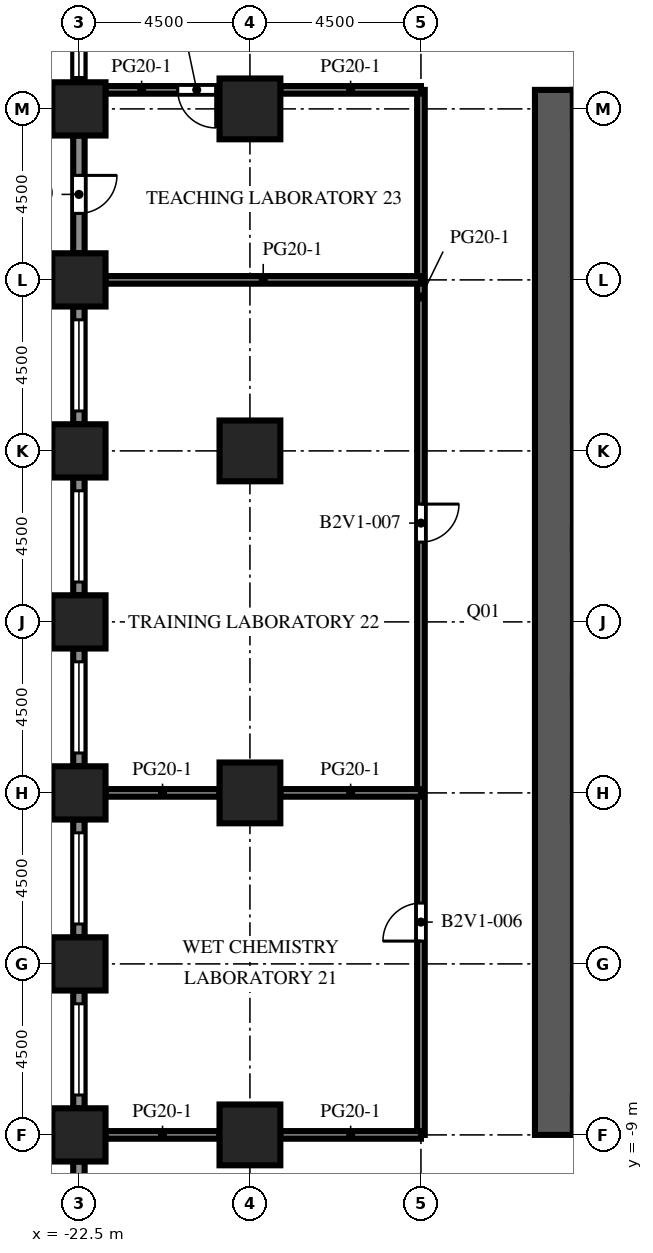
"""IFC4 building model, lengths in metres.
Left out: names, types, materials, properties, quantities, classifications, styles, units other than length and angle.
Written with IfcOpenShell. Run it as: python <this file> out.ifc"""

import sys

from ifc_helpers import new_model, si_unit, direction, frame, frame_2d, origin, origin_2d, place, context, subcontext, project, spatial, rectangle, extrude, element, fill, save


model = new_model("IFC4")
c1 = context("Model", 3, precision=1e-05, world=origin(), true_north=direction((0.0, 1.0)))
c2 = subcontext(c1, "Body", "Model", "MODEL_VIEW")
j1 = project(units=[si_unit("LENGTHUNIT", "METRE"), si_unit("PLANEANGLEUNIT", "RADIAN")], contexts=[c1])
p1 = place(None, origin())
s1 = spatial("IfcSite", under=j1, at=p1, CompositionType="ELEMENT")
p2 = place(p1, origin())
s2 = spatial("IfcBuilding", under=s1, at=p2, CompositionType="ELEMENT")
p3 = place(p2, frame((0.0, 0.0, 46.0)))
s3 = spatial("IfcBuildingStorey", under=s2, at=p3, CompositionType="ELEMENT", Elevation=46.0)
for number, where, z_axis, x_axis in (
    (1, (-22.5, -9.0, 0.0), (0.0, 0.0, 1.0), (1.0, 0.0, 0.0)),
    (2, (-22.5, -4.5, 0.0), (0.0, 0.0, 1.0), (1.0, 0.0, 0.0)),
    (3, (-22.5, 0.0, 0.0), (0.0, 0.0, 1.0), (1.0, 0.0, 0.0)),
    (4, (-22.5, 4.5, 0.0), (0.0, 0.0, 1.0), (1.0, 0.0, 0.0)),
    (5, (-22.5, 9.0, 0.0), (0.0, 0.0, 1.0), (1.0, 0.0, 0.0)),
    (6, (-22.5, 13.5, 0.0), (0.0, 0.0, 1.0), (1.0, 0.0, 0.0)),
    (7, (-22.5, 18.0, 0.0), (0.0, 0.0, 1.0), (1.0, 0.0, 0.0)),
):
    element("IfcColumn", number, at=place(p3, frame(where, z_axis=z_axis, x_axis=x_axis)), inside=s3, PredefinedType="COLUMN", context=c2, shape_type="SweptSolid", body=[
        extrude(rectangle(XDim=1.4, YDim=1.4, at=origin_2d()), origin(), (0.0, 0.0, 1.0), 4.1),
    ])
for number, where, z_axis, x_axis in (
    (8, (-18.0, -9.0, 0.0), (0.0, 0.0, 1.0), (1.0, 0.0, 0.0)),
    (9, (-18.0, 0.0, 0.0), (0.0, 0.0, 1.0), (1.0, 0.0, 0.0)),
    (10, (-18.0, 9.0, 0.0), (0.0, 0.0, 1.0), (1.0, 0.0, 0.0)),
    (11, (-18.0, 18.0, 0.0), (0.0, 0.0, 1.0), (1.0, 0.0, 0.0)),
):
    element("IfcColumn", number, at=place(p3, frame(where, z_axis=z_axis, x_axis=x_axis)), inside=s3, PredefinedType="COLUMN", context=c2, shape_type="SweptSolid", body=[
        extrude(rectangle(XDim=1.6, YDim=1.6, at=origin_2d()), origin(), (0.0, 0.0, 1.0), 4.1),
    ])
p4 = place(p3, frame((-10.0, -9.0, 0.0), z_axis=(0.0, 0.0, 1.0), x_axis=(0.0, 1.0, 0.0)))
e12 = element("IfcWall", 12, at=p4, inside=s3, PredefinedType="SHEAR", context=c2, shape_type="SweptSolid", body=[
    extrude(rectangle(XDim=27.5, YDim=1.0, at=frame_2d((13.75, 0.0))), origin(), (0.0, 0.0, 1.0), 4.1),
])
p5 = place(p4, frame((12.55, 0.0, 0.0)))
e13 = element("IfcOpeningElement", 13, at=p5, cuts=e12, PredefinedType="OPENING", context=c2, shape_type="SweptSolid", body=[
    extrude(rectangle(XDim=2.4, YDim=2.4, at=frame_2d((1.2, 1.2))), frame((0.0, 0.51, 0.0), z_axis=(0.0, -1.0, 0.0), x_axis=(1.0, 0.0, 0.0)), (0.0, 0.0, 1.0), 1.02),
])
p6 = place(p4, frame((6.825, 0.0, 0.0)))
e14 = element("IfcOpeningElement", 14, at=p6, cuts=e12, PredefinedType="OPENING", context=c2, shape_type="SweptSolid", body=[
    extrude(rectangle(XDim=1.2, YDim=2.1, at=frame_2d((0.6, 1.05))), frame((0.0, 0.51, 0.0), z_axis=(0.0, -1.0, 0.0), x_axis=(1.0, 0.0, 0.0)), (0.0, 0.0, 1.0), 1.02),
])
p7 = place(p4, frame((19.475, 0.0, 0.0)))
e15 = element("IfcOpeningElement", 15, at=p7, cuts=e12, PredefinedType="OPENING", context=c2, shape_type="SweptSolid", body=[
    extrude(rectangle(XDim=1.2, YDim=2.1, at=frame_2d((0.6, 1.05))), frame((0.0, 0.51, 0.0), z_axis=(0.0, -1.0, 0.0), x_axis=(1.0, 0.0, 0.0)), (0.0, 0.0, 1.0), 1.02),
])
p8 = place(p3, frame((-22.5, 18.7, 0.0), z_axis=(0.0, 0.0, 1.0), x_axis=(0.0, 1.0, 0.0)))
e16 = element("IfcWall", 16, at=p8, inside=s3, PredefinedType="SOLIDWALL", context=c2, shape_type="SweptSolid", body=[
    extrude(rectangle(XDim=3.1, YDim=0.3, at=frame_2d((1.55, 0.0))), origin(), (0.0, 0.0, 1.0), 2.75),
])
p9 = place(p8, frame((0.125, 0.0, 0.8)))
e17 = element("IfcOpeningElement", 17, at=p9, cuts=e16, PredefinedType="OPENING", context=c2, shape_type="SweptSolid", body=[
    extrude(rectangle(XDim=2.4, YDim=1.7, at=frame_2d((1.2, 0.85))), frame((0.0, 0.16, 0.0), z_axis=(0.0, -1.0, 0.0), x_axis=(1.0, 0.0, 0.0)), (0.0, 0.0, 1.0), 0.32),
])
p10 = place(p3, frame((-22.5, 14.2, 0.0), z_axis=(0.0, 0.0, 1.0), x_axis=(0.0, 1.0, 0.0)))
e18 = element("IfcWall", 18, at=p10, inside=s3, PredefinedType="SOLIDWALL", context=c2, shape_type="SweptSolid", body=[
    extrude(rectangle(XDim=3.1, YDim=0.3, at=frame_2d((1.55, 0.0))), origin(), (0.0, 0.0, 1.0), 2.75),
])
p11 = place(p10, frame((1.05, 0.0, 0.0)))
e19 = element("IfcOpeningElement", 19, at=p11, cuts=e18, PredefinedType="OPENING", context=c2, shape_type="SweptSolid", body=[
    extrude(rectangle(XDim=1.0, YDim=2.2, at=frame_2d((0.5, 1.1))), frame((0.0, 0.16, 0.0), z_axis=(0.0, -1.0, 0.0), x_axis=(1.0, 0.0, 0.0)), (0.0, 0.0, 1.0), 0.32),
])
p12 = place(p3, frame((-22.5, 9.7, 0.0), z_axis=(0.0, 0.0, 1.0), x_axis=(0.0, 1.0, 0.0)))
e20 = element("IfcWall", 20, at=p12, inside=s3, PredefinedType="SOLIDWALL", context=c2, shape_type="SweptSolid", body=[
    extrude(rectangle(XDim=3.1, YDim=0.3, at=frame_2d((1.55, 0.0))), origin(), (0.0, 0.0, 1.0), 2.75),
])
p13 = place(p12, frame((0.35, 0.0, 0.8)))
e21 = element("IfcOpeningElement", 21, at=p13, cuts=e20, PredefinedType="OPENING", context=c2, shape_type="SweptSolid", body=[
    extrude(rectangle(XDim=2.4, YDim=1.7, at=frame_2d((1.2, 0.85))), frame((0.0, 0.16, 0.0), z_axis=(0.0, -1.0, 0.0), x_axis=(1.0, 0.0, 0.0)), (0.0, 0.0, 1.0), 0.32),
])
p14 = place(p3, frame((-22.5, 5.2, 0.0), z_axis=(0.0, 0.0, 1.0), x_axis=(0.0, 1.0, 0.0)))
e22 = element("IfcWall", 22, at=p14, inside=s3, PredefinedType="SOLIDWALL", context=c2, shape_type="SweptSolid", body=[
    extrude(rectangle(XDim=3.1, YDim=0.3, at=frame_2d((1.55, 0.0))), origin(), (0.0, 0.0, 1.0), 2.75),
])
p15 = place(p14, frame((0.35, 0.0, 0.8)))
e23 = element("IfcOpeningElement", 23, at=p15, cuts=e22, PredefinedType="OPENING", context=c2, shape_type="SweptSolid", body=[
    extrude(rectangle(XDim=2.4, YDim=1.7, at=frame_2d((1.2, 0.85))), frame((0.0, 0.16, 0.0), z_axis=(0.0, -1.0, 0.0), x_axis=(1.0, 0.0, 0.0)), (0.0, 0.0, 1.0), 0.32),
])
p16 = place(p3, frame((-22.5, 0.7, 0.0), z_axis=(0.0, 0.0, 1.0), x_axis=(0.0, 1.0, 0.0)))
e24 = element("IfcWall", 24, at=p16, inside=s3, PredefinedType="SOLIDWALL", context=c2, shape_type="SweptSolid", body=[
    extrude(rectangle(XDim=3.1, YDim=0.3, at=frame_2d((1.55, 0.0))), origin(), (0.0, 0.0, 1.0), 2.75),
])
p17 = place(p16, frame((0.35, 0.0, 0.8)))
e25 = element("IfcOpeningElement", 25, at=p17, cuts=e24, PredefinedType="OPENING", context=c2, shape_type="SweptSolid", body=[
    extrude(rectangle(XDim=2.4, YDim=1.7, at=frame_2d((1.2, 0.85))), frame((0.0, 0.16, 0.0), z_axis=(0.0, -1.0, 0.0), x_axis=(1.0, 0.0, 0.0)), (0.0, 0.0, 1.0), 0.32),
])
p18 = place(p3, frame((-22.5, -3.8, 0.0), z_axis=(0.0, 0.0, 1.0), x_axis=(0.0, 1.0, 0.0)))
e26 = element("IfcWall", 26, at=p18, inside=s3, PredefinedType="SOLIDWALL", context=c2, shape_type="SweptSolid", body=[
    extrude(rectangle(XDim=3.1, YDim=0.3, at=frame_2d((1.55, 0.0))), origin(), (0.0, 0.0, 1.0), 2.75),
])
p19 = place(p18, frame((0.35, 0.0, 0.8)))
e27 = element("IfcOpeningElement", 27, at=p19, cuts=e26, PredefinedType="OPENING", context=c2, shape_type="SweptSolid", body=[
    extrude(rectangle(XDim=2.4, YDim=1.7, at=frame_2d((1.2, 0.85))), frame((0.0, 0.16, 0.0), z_axis=(0.0, -1.0, 0.0), x_axis=(1.0, 0.0, 0.0)), (0.0, 0.0, 1.0), 0.32),
])
p20 = place(p3, frame((-22.5, -8.3, 0.0), z_axis=(0.0, 0.0, 1.0), x_axis=(0.0, 1.0, 0.0)))
e28 = element("IfcWall", 28, at=p20, inside=s3, PredefinedType="SOLIDWALL", context=c2, shape_type="SweptSolid", body=[
    extrude(rectangle(XDim=3.1, YDim=0.3, at=frame_2d((1.55, 0.0))), origin(), (0.0, 0.0, 1.0), 2.75),
])
p21 = place(p20, frame((0.35, 0.0, 0.8)))
e29 = element("IfcOpeningElement", 29, at=p21, cuts=e28, PredefinedType="OPENING", context=c2, shape_type="SweptSolid", body=[
    extrude(rectangle(XDim=2.4, YDim=1.7, at=frame_2d((1.2, 0.85))), frame((0.0, 0.16, 0.0), z_axis=(0.0, -1.0, 0.0), x_axis=(1.0, 0.0, 0.0)), (0.0, 0.0, 1.0), 0.32),
])
p22 = place(p3, frame((-22.5, -12.8, 0.0), z_axis=(0.0, 0.0, 1.0), x_axis=(0.0, 1.0, 0.0)))
e30 = element("IfcWall", 30, at=p22, inside=s3, PredefinedType="SOLIDWALL", context=c2, shape_type="SweptSolid", body=[
    extrude(rectangle(XDim=3.1, YDim=0.3, at=frame_2d((1.55, 0.0))), origin(), (0.0, 0.0, 1.0), 2.75),
])
p23 = place(p22, frame((1.425, 0.0, 0.8)))
e31 = element("IfcOpeningElement", 31, at=p23, cuts=e30, PredefinedType="OPENING", context=c2, shape_type="SweptSolid", body=[
    extrude(rectangle(XDim=1.2, YDim=1.7, at=frame_2d((0.6, 0.85))), frame((0.0, 0.16, 0.0), z_axis=(0.0, -1.0, 0.0), x_axis=(1.0, 0.0, 0.0)), (0.0, 0.0, 1.0), 0.32),
])
p24 = place(p3, frame((-13.5, -9.0, 0.0), z_axis=(0.0, 0.0, 1.0), x_axis=(0.0, 1.0, 0.0)))
e32 = element("IfcWall", 32, at=p24, inside=s3, PredefinedType="PARTITIONING", context=c2, shape_type="SweptSolid", body=[
    extrude(rectangle(XDim=27.5, YDim=0.2, at=frame_2d((13.75, 0.0))), origin(), (0.0, 0.0, 1.0), 3.65),
])
p25 = place(p24, frame((5.1, 0.0, 0.0)))
e33 = element("IfcOpeningElement", 33, at=p25, cuts=e32, PredefinedType="OPENING", context=c2, shape_type="SweptSolid", body=[
    extrude(rectangle(XDim=1.0, YDim=2.1, at=frame_2d((0.5, 1.05))), frame((0.0, 0.11, 0.0), z_axis=(0.0, -1.0, 0.0), x_axis=(1.0, 0.0, 0.0)), (0.0, 0.0, 1.0), 0.22),
])
p26 = place(p24, frame((15.6, 0.0, 0.0)))
e34 = element("IfcOpeningElement", 34, at=p26, cuts=e32, PredefinedType="OPENING", context=c2, shape_type="SweptSolid", body=[
    extrude(rectangle(XDim=1.0, YDim=2.1, at=frame_2d((0.5, 1.05))), frame((0.0, 0.11, 0.0), z_axis=(0.0, -1.0, 0.0), x_axis=(1.0, 0.0, 0.0)), (0.0, 0.0, 1.0), 0.22),
])
p27 = place(p3, frame((-21.8, -9.0, 0.0), z_axis=(0.0, 0.0, 1.0), x_axis=(1.0, 0.0, 0.0)))
e35 = element("IfcWall", 35, at=p27, inside=s3, PredefinedType="PARTITIONING", context=c2, shape_type="SweptSolid", body=[
    extrude(rectangle(XDim=3.0, YDim=0.2, at=frame_2d((1.5, 0.0))), origin(), (0.0, 0.0, 1.0), 3.65),
])
p28 = place(p3, frame((-17.2, -9.0, 0.0), z_axis=(0.0, 0.0, 1.0), x_axis=(1.0, 0.0, 0.0)))
e36 = element("IfcWall", 36, at=p28, inside=s3, PredefinedType="PARTITIONING", context=c2, shape_type="SweptSolid", body=[
    extrude(rectangle(XDim=3.7, YDim=0.2, at=frame_2d((1.85, 0.0))), origin(), (0.0, 0.0, 1.0), 3.65),
])
p29 = place(p3, frame((-21.8, 0.0, 0.0), z_axis=(0.0, 0.0, 1.0), x_axis=(1.0, 0.0, 0.0)))
e37 = element("IfcWall", 37, at=p29, inside=s3, PredefinedType="PARTITIONING", context=c2, shape_type="SweptSolid", body=[
    extrude(rectangle(XDim=3.0, YDim=0.2, at=frame_2d((1.5, 0.0))), origin(), (0.0, 0.0, 1.0), 3.65),
])
p30 = place(p3, frame((-17.2, 0.0, 0.0), z_axis=(0.0, 0.0, 1.0), x_axis=(1.0, 0.0, 0.0)))
e38 = element("IfcWall", 38, at=p30, inside=s3, PredefinedType="PARTITIONING", context=c2, shape_type="SweptSolid", body=[
    extrude(rectangle(XDim=3.7, YDim=0.2, at=frame_2d((1.85, 0.0))), origin(), (0.0, 0.0, 1.0), 3.65),
])
p31 = place(p3, frame((-21.8, 13.5, 0.0), z_axis=(0.0, 0.0, 1.0), x_axis=(1.0, 0.0, 0.0)))
e39 = element("IfcWall", 39, at=p31, inside=s3, PredefinedType="PARTITIONING", context=c2, shape_type="SweptSolid", body=[
    extrude(rectangle(XDim=8.3, YDim=0.2, at=frame_2d((4.15, 0.0))), origin(), (0.0, 0.0, 1.0), 3.65),
])
p32 = place(p3, frame((-18.8, 18.5, 0.0), z_axis=(0.0, 0.0, 1.0), x_axis=(-1.0, 0.0, 0.0)))
e40 = element("IfcWall", 40, at=p32, inside=s3, PredefinedType="PARTITIONING", context=c2, shape_type="SweptSolid", body=[
    extrude(rectangle(XDim=3.0, YDim=0.2, at=frame_2d((1.5, 0.0))), origin(), (0.0, 0.0, 1.0), 3.65),
])
p33 = place(p32, frame((0.1, 0.0, 0.0)))
e41 = element("IfcOpeningElement", 41, at=p33, cuts=e40, PredefinedType="OPENING", context=c2, shape_type="SweptSolid", body=[
    extrude(rectangle(XDim=1.0, YDim=2.1, at=frame_2d((0.5, 1.05))), frame((0.0, 0.11, 0.0), z_axis=(0.0, -1.0, 0.0), x_axis=(1.0, 0.0, 0.0)), (0.0, 0.0, 1.0), 0.22),
])
p34 = place(p3, frame((-17.2, 18.5, 0.0), z_axis=(0.0, 0.0, 1.0), x_axis=(1.0, 0.0, 0.0)))
e42 = element("IfcWall", 42, at=p34, inside=s3, PredefinedType="PARTITIONING", context=c2, shape_type="SweptSolid", body=[
    extrude(rectangle(XDim=3.7, YDim=0.2, at=frame_2d((1.85, 0.0))), origin(), (0.0, 0.0, 1.0), 3.65),
])
p35 = place(p9, origin())
e43 = element("IfcWindow", 43, at=p35, inside=s3, PartitioningType="SINGLE_PANEL", PredefinedType="WINDOW", context=c2, shape_type="SweptSolid", body=[
    extrude(rectangle(XDim=2.4, YDim=1.7, at=frame_2d((1.2, 0.85))), frame((0.0, 0.03, 0.0), z_axis=(0.0, -1.0, 0.0), x_axis=(1.0, 0.0, 0.0)), (0.0, 0.0, 1.0), 0.06),
])
fill(e17, e43)
p36 = place(p11, origin())
e44 = element("IfcDoor", 44, at=p36, inside=s3, OperationType="SINGLE_SWING_RIGHT", PredefinedType="DOOR", context=c2, shape_type="SweptSolid", body=[
    extrude(rectangle(XDim=1.0, YDim=2.2, at=frame_2d((0.5, 1.1))), frame((0.0, 0.025, 0.0), z_axis=(0.0, -1.0, 0.0), x_axis=(1.0, 0.0, 0.0)), (0.0, 0.0, 1.0), 0.05),
])
fill(e19, e44)
p37 = place(p13, origin())
e45 = element("IfcWindow", 45, at=p37, inside=s3, PartitioningType="SINGLE_PANEL", PredefinedType="WINDOW", context=c2, shape_type="SweptSolid", body=[
    extrude(rectangle(XDim=2.4, YDim=1.7, at=frame_2d((1.2, 0.85))), frame((0.0, 0.03, 0.0), z_axis=(0.0, -1.0, 0.0), x_axis=(1.0, 0.0, 0.0)), (0.0, 0.0, 1.0), 0.06),
])
fill(e21, e45)
p38 = place(p15, origin())
e46 = element("IfcWindow", 46, at=p38, inside=s3, PartitioningType="SINGLE_PANEL", PredefinedType="WINDOW", context=c2, shape_type="SweptSolid", body=[
    extrude(rectangle(XDim=2.4, YDim=1.7, at=frame_2d((1.2, 0.85))), frame((0.0, 0.03, 0.0), z_axis=(0.0, -1.0, 0.0), x_axis=(1.0, 0.0, 0.0)), (0.0, 0.0, 1.0), 0.06),
])
fill(e23, e46)
p39 = place(p17, origin())
e47 = element("IfcWindow", 47, at=p39, inside=s3, PartitioningType="SINGLE_PANEL", PredefinedType="WINDOW", context=c2, shape_type="SweptSolid", body=[
    extrude(rectangle(XDim=2.4, YDim=1.7, at=frame_2d((1.2, 0.85))), frame((0.0, 0.03, 0.0), z_axis=(0.0, -1.0, 0.0), x_axis=(1.0, 0.0, 0.0)), (0.0, 0.0, 1.0), 0.06),
])
fill(e25, e47)
p40 = place(p19, origin())
e48 = element("IfcWindow", 48, at=p40, inside=s3, PartitioningType="SINGLE_PANEL", PredefinedType="WINDOW", context=c2, shape_type="SweptSolid", body=[
    extrude(rectangle(XDim=2.4, YDim=1.7, at=frame_2d((1.2, 0.85))), frame((0.0, 0.03, 0.0), z_axis=(0.0, -1.0, 0.0), x_axis=(1.0, 0.0, 0.0)), (0.0, 0.0, 1.0), 0.06),
])
fill(e27, e48)
p41 = place(p21, origin())
e49 = element("IfcWindow", 49, at=p41, inside=s3, PartitioningType="SINGLE_PANEL", PredefinedType="WINDOW", context=c2, shape_type="SweptSolid", body=[
    extrude(rectangle(XDim=2.4, YDim=1.7, at=frame_2d((1.2, 0.85))), frame((0.0, 0.03, 0.0), z_axis=(0.0, -1.0, 0.0), x_axis=(1.0, 0.0, 0.0)), (0.0, 0.0, 1.0), 0.06),
])
fill(e29, e49)
p42 = place(p5, origin())
e50 = element("IfcDoor", 50, at=p42, inside=s3, OperationType="DOUBLE_DOOR_DOUBLE_SWING", PredefinedType="DOOR", context=c2, shape_type="SweptSolid", body=[
    extrude(rectangle(XDim=2.4, YDim=2.4, at=frame_2d((1.2, 1.2))), frame((0.0, 0.025, 0.0), z_axis=(0.0, -1.0, 0.0), x_axis=(1.0, 0.0, 0.0)), (0.0, 0.0, 1.0), 0.05),
])
fill(e13, e50)
p43 = place(p6, origin())
e51 = element("IfcDoor", 51, at=p43, inside=s3, OperationType="SINGLE_SWING_LEFT", PredefinedType="DOOR", context=c2, shape_type="SweptSolid", body=[
    extrude(rectangle(XDim=1.2, YDim=2.1, at=frame_2d((0.6, 1.05))), frame((0.0, 0.025, 0.0), z_axis=(0.0, -1.0, 0.0), x_axis=(1.0, 0.0, 0.0)), (0.0, 0.0, 1.0), 0.05),
])
fill(e14, e51)
p44 = place(p7, origin())
e52 = element("IfcDoor", 52, at=p44, inside=s3, OperationType="SINGLE_SWING_LEFT", PredefinedType="DOOR", context=c2, shape_type="SweptSolid", body=[
    extrude(rectangle(XDim=1.2, YDim=2.1, at=frame_2d((0.6, 1.05))), frame((0.0, 0.025, 0.0), z_axis=(0.0, -1.0, 0.0), x_axis=(1.0, 0.0, 0.0)), (0.0, 0.0, 1.0), 0.05),
])
fill(e15, e52)
p45 = place(p25, origin())
e53 = element("IfcDoor", 53, at=p45, inside=s3, OperationType="SINGLE_SWING_LEFT", PredefinedType="DOOR", context=c2, shape_type="SweptSolid", body=[
    extrude(rectangle(XDim=1.0, YDim=2.1, at=frame_2d((0.5, 1.05))), frame((0.0, 0.025, 0.0), z_axis=(0.0, -1.0, 0.0), x_axis=(1.0, 0.0, 0.0)), (0.0, 0.0, 1.0), 0.05),
])
fill(e33, e53)
p46 = place(p26, origin())
e54 = element("IfcDoor", 54, at=p46, inside=s3, OperationType="SINGLE_SWING_RIGHT", PredefinedType="DOOR", context=c2, shape_type="SweptSolid", body=[
    extrude(rectangle(XDim=1.0, YDim=2.1, at=frame_2d((0.5, 1.05))), frame((0.0, 0.025, 0.0), z_axis=(0.0, -1.0, 0.0), x_axis=(1.0, 0.0, 0.0)), (0.0, 0.0, 1.0), 0.05),
])
fill(e34, e54)
p47 = place(p33, origin())
e55 = element("IfcDoor", 55, at=p47, inside=s3, OperationType="SINGLE_SWING_LEFT", PredefinedType="DOOR", context=c2, shape_type="SweptSolid", body=[
    extrude(rectangle(XDim=1.0, YDim=2.1, at=frame_2d((0.5, 1.05))), frame((0.0, 0.025, 0.0), z_axis=(0.0, -1.0, 0.0), x_axis=(1.0, 0.0, 0.0)), (0.0, 0.0, 1.0), 0.05),
])
fill(e41, e55)
save(model, sys.argv[1])
